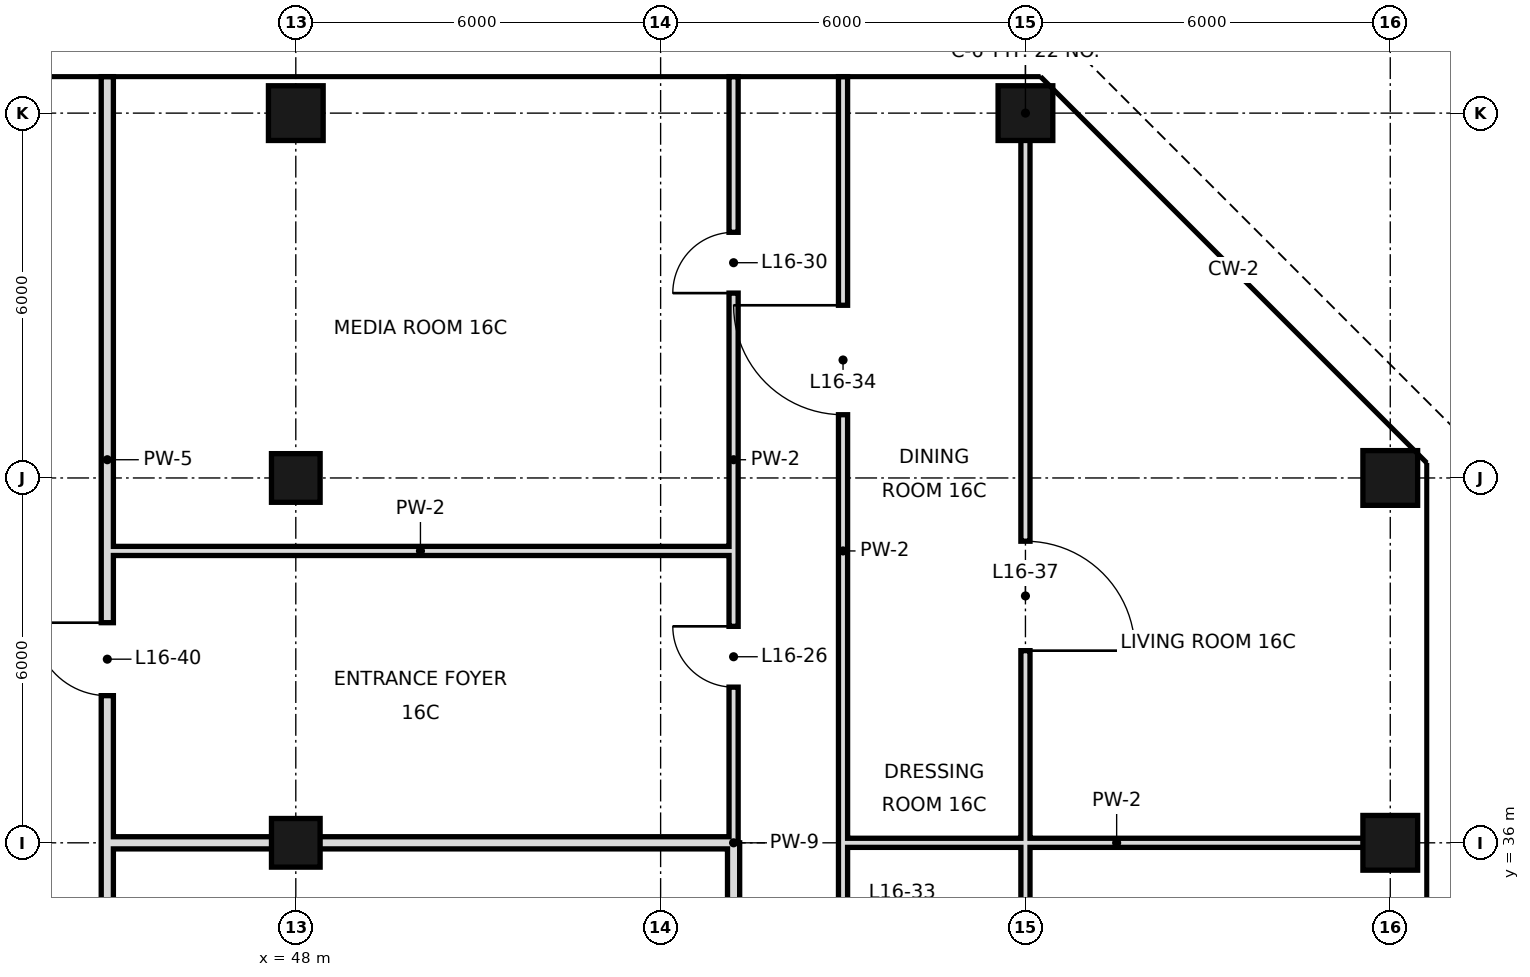
"""IFC4 building model, lengths in metres.
Left out: names, types, materials, properties, quantities, classifications, styles, units other than length and angle.
Written with IfcOpenShell. Run it as: python <this file> out.ifc"""

import sys

from ifc_helpers import new_model, si_unit, direction, frame, frame_2d, origin, origin_2d, place, context, subcontext, project, spatial, rectangle, hollow_rectangle, extrude, element, fill, save


model = new_model("IFC4")
c1 = context("Model", 3, precision=1e-05, world=origin(), true_north=direction((0.0, 1.0)))
c2 = subcontext(c1, "Body", "Model", "MODEL_VIEW")
j1 = project(units=[si_unit("LENGTHUNIT", "METRE"), si_unit("PLANEANGLEUNIT", "RADIAN")], contexts=[c1])
p1 = place(None, origin())
s1 = spatial("IfcSite", under=j1, at=p1, CompositionType="ELEMENT")
p2 = place(p1, origin())
s2 = spatial("IfcBuilding", under=s1, at=p2, CompositionType="ELEMENT")
p3 = place(p2, frame((0.0, 0.0, 78.6)))
s3 = spatial("IfcBuildingStorey", under=s2, at=p3, CompositionType="ELEMENT", Elevation=78.6)
for number, where, z_axis, x_axis in (
    (1, (48.0, 36.0, 0.0), (0.0, 0.0, 1.0), (1.0, 0.0, 0.0)),
    (2, (48.0, 42.0, 0.0), (0.0, 0.0, 1.0), (1.0, 0.0, 0.0)),
):
    element("IfcColumn", number, at=place(p3, frame(where, z_axis=z_axis, x_axis=x_axis)), inside=s3, PredefinedType="COLUMN", context=c2, shape_type="SweptSolid", body=[
        extrude(hollow_rectangle(XDim=0.8, YDim=0.8, WallThickness=0.04, at=origin_2d()), origin(), (0.0, 0.0, 1.0), 3.6),
    ])
for number, where, z_axis, x_axis in (
    (3, (48.0, 48.0, 0.0), (0.0, 0.0, 1.0), (1.0, 0.0, 0.0)),
    (4, (60.0, 48.0, 0.0), (0.0, 0.0, 1.0), (1.0, 0.0, 0.0)),
    (5, (66.0, 36.0, 0.0), (0.0, 0.0, 1.0), (1.0, 0.0, 0.0)),
    (6, (66.0, 42.0, 0.0), (0.0, 0.0, 1.0), (1.0, 0.0, 0.0)),
):
    element("IfcColumn", number, at=place(p3, frame(where, z_axis=z_axis, x_axis=x_axis)), inside=s3, PredefinedType="COLUMN", context=c2, shape_type="SweptSolid", body=[
        extrude(hollow_rectangle(XDim=0.9, YDim=0.9, WallThickness=0.045, at=origin_2d()), origin(), (0.0, 0.0, 1.0), 3.6),
    ])
p4 = place(p3, frame((44.9, 36.0, 0.0), z_axis=(0.0, 0.0, 1.0), x_axis=(0.0, 1.0, 0.0)))
e7 = element("IfcWall", 7, at=p4, inside=s3, PredefinedType="SOLIDWALL", context=c2, shape_type="SweptSolid", body=[
    extrude(rectangle(XDim=12.6, YDim=0.2, at=frame_2d((6.3, 0.0))), origin(), (0.0, 0.0, 1.0), 2.72),
])
p5 = place(p4, frame((2.42, 0.0, 0.0)))
e8 = element("IfcOpeningElement", 8, at=p5, cuts=e7, PredefinedType="OPENING", context=c2, shape_type="SweptSolid", body=[
    extrude(rectangle(XDim=1.2, YDim=2.4, at=frame_2d((0.6, 1.2))), frame((0.0, 0.11, 0.0), z_axis=(0.0, -1.0, 0.0), x_axis=(1.0, 0.0, 0.0)), (0.0, 0.0, 1.0), 0.22),
])
p6 = place(p3, frame((44.9, 32.4, 0.0), z_axis=(0.0, 0.0, 1.0), x_axis=(0.0, 1.0, 0.0)))
e9 = element("IfcWall", 9, at=p6, inside=s3, PredefinedType="SOLIDWALL", context=c2, shape_type="SweptSolid", body=[
    extrude(rectangle(XDim=3.6, YDim=0.2, at=frame_2d((1.8, 0.0))), origin(), (0.0, 0.0, 1.0), 3.42),
])
p7 = place(p3, frame((55.2, 32.4, 0.0), z_axis=(0.0, 0.0, 1.0), x_axis=(0.0, 1.0, 0.0)))
e10 = element("IfcWall", 10, at=p7, inside=s3, PredefinedType="SOLIDWALL", context=c2, shape_type="SweptSolid", body=[
    extrude(rectangle(XDim=3.6, YDim=0.2, at=frame_2d((1.8, 0.0))), origin(), (0.0, 0.0, 1.0), 2.52),
])
p8 = place(p7, frame((0.88, 0.0, 0.0)))
e11 = element("IfcOpeningElement", 11, at=p8, cuts=e10, PredefinedType="OPENING", context=c2, shape_type="SweptSolid", body=[
    extrude(rectangle(XDim=1.0, YDim=2.4, at=frame_2d((0.5, 1.2))), frame((0.0, 0.11, 0.0), z_axis=(0.0, -1.0, 0.0), x_axis=(1.0, 0.0, 0.0)), (0.0, 0.0, 1.0), 0.22),
])
p9 = place(p3, frame((55.2, 36.0, 0.0), z_axis=(0.0, 0.0, 1.0), x_axis=(0.0, 1.0, 0.0)))
e12 = element("IfcWall", 12, at=p9, inside=s3, PredefinedType="PARTITIONING", context=c2, shape_type="SweptSolid", body=[
    extrude(rectangle(XDim=12.6, YDim=0.15, at=frame_2d((6.3, 0.0))), origin(), (0.0, 0.0, 1.0), 3.42),
])
p10 = place(p9, frame((2.56, 0.0, 0.0)))
e13 = element("IfcOpeningElement", 13, at=p10, cuts=e12, PredefinedType="OPENING", context=c2, shape_type="SweptSolid", body=[
    extrude(rectangle(XDim=1.0, YDim=2.4, at=frame_2d((0.5, 1.2))), frame((0.0, 0.085, 0.0), z_axis=(0.0, -1.0, 0.0), x_axis=(1.0, 0.0, 0.0)), (0.0, 0.0, 1.0), 0.17),
])
p11 = place(p9, frame((9.04, 0.0, 0.0)))
e14 = element("IfcOpeningElement", 14, at=p11, cuts=e12, PredefinedType="OPENING", context=c2, shape_type="SweptSolid", body=[
    extrude(rectangle(XDim=1.0, YDim=2.4, at=frame_2d((0.5, 1.2))), frame((0.0, 0.085, 0.0), z_axis=(0.0, -1.0, 0.0), x_axis=(1.0, 0.0, 0.0)), (0.0, 0.0, 1.0), 0.17),
])
p12 = place(p3, frame((57.0, 33.0, 0.0), z_axis=(0.0, 0.0, 1.0), x_axis=(0.0, 1.0, 0.0)))
e15 = element("IfcWall", 15, at=p12, inside=s3, PredefinedType="PARTITIONING", context=c2, shape_type="SweptSolid", body=[
    extrude(rectangle(XDim=15.6, YDim=0.15, at=frame_2d((7.8, 0.0))), origin(), (0.0, 0.0, 1.0), 3.42),
])
p13 = place(p12, frame((0.7, 0.0, 0.0)))
e16 = element("IfcOpeningElement", 16, at=p13, cuts=e15, PredefinedType="OPENING", context=c2, shape_type="SweptSolid", body=[
    extrude(rectangle(XDim=1.0, YDim=2.4, at=frame_2d((0.5, 1.2))), frame((0.0, 0.085, 0.0), z_axis=(0.0, -1.0, 0.0), x_axis=(1.0, 0.0, 0.0)), (0.0, 0.0, 1.0), 0.17),
])
p14 = place(p12, frame((10.04, 0.0, 0.0)))
e17 = element("IfcOpeningElement", 17, at=p14, cuts=e15, PredefinedType="OPENING", context=c2, shape_type="SweptSolid", body=[
    extrude(rectangle(XDim=1.8, YDim=2.4, at=frame_2d((0.9, 1.2))), frame((0.0, 0.085, 0.0), z_axis=(0.0, -1.0, 0.0), x_axis=(1.0, 0.0, 0.0)), (0.0, 0.0, 1.0), 0.17),
])
p15 = place(p3, frame((60.0, 33.0, 0.0), z_axis=(0.0, 0.0, 1.0), x_axis=(0.0, 1.0, 0.0)))
e18 = element("IfcWall", 18, at=p15, inside=s3, PredefinedType="PARTITIONING", context=c2, shape_type="SweptSolid", body=[
    extrude(rectangle(XDim=15.0, YDim=0.15, at=frame_2d((7.5, 0.0))), origin(), (0.0, 0.0, 1.0), 3.42),
])
p16 = place(p15, frame((0.7, 0.0, 0.0)))
e19 = element("IfcOpeningElement", 19, at=p16, cuts=e18, PredefinedType="OPENING", context=c2, shape_type="SweptSolid", body=[
    extrude(rectangle(XDim=1.0, YDim=2.4, at=frame_2d((0.5, 1.2))), frame((0.0, 0.085, 0.0), z_axis=(0.0, -1.0, 0.0), x_axis=(1.0, 0.0, 0.0)), (0.0, 0.0, 1.0), 0.17),
])
p17 = place(p15, frame((6.16, 0.0, 0.0)))
e20 = element("IfcOpeningElement", 20, at=p17, cuts=e18, PredefinedType="OPENING", context=c2, shape_type="SweptSolid", body=[
    extrude(rectangle(XDim=1.8, YDim=2.4, at=frame_2d((0.9, 1.2))), frame((0.0, 0.085, 0.0), z_axis=(0.0, -1.0, 0.0), x_axis=(1.0, 0.0, 0.0)), (0.0, 0.0, 1.0), 0.17),
])
p18 = place(p3, frame((44.9, 36.0, 0.0), z_axis=(0.0, 0.0, 1.0), x_axis=(1.0, 0.0, 0.0)))
e21 = element("IfcWall", 21, at=p18, inside=s3, PredefinedType="SOLIDWALL", context=c2, shape_type="SweptSolid", body=[
    extrude(rectangle(XDim=10.3, YDim=0.2, at=frame_2d((5.15, 0.0))), origin(), (0.0, 0.0, 1.0), 2.52),
])
p19 = place(p3, frame((57.0, 36.0, 0.0), z_axis=(0.0, 0.0, 1.0), x_axis=(1.0, 0.0, 0.0)))
e22 = element("IfcWall", 22, at=p19, inside=s3, PredefinedType="PARTITIONING", context=c2, shape_type="SweptSolid", body=[
    extrude(rectangle(XDim=9.0, YDim=0.15, at=frame_2d((4.5, 0.0))), origin(), (0.0, 0.0, 1.0), 2.52),
])
p20 = place(p3, frame((44.9, 40.8, 0.0), z_axis=(0.0, 0.0, 1.0), x_axis=(1.0, 0.0, 0.0)))
e23 = element("IfcWall", 23, at=p20, inside=s3, PredefinedType="PARTITIONING", context=c2, shape_type="SweptSolid", body=[
    extrude(rectangle(XDim=10.3, YDim=0.15, at=frame_2d((5.15, 0.0))), origin(), (0.0, 0.0, 1.0), 3.42),
])
p21 = place(p10, frame((1.0, 0.0, 0.0), z_axis=(0.0, 0.0, 1.0), x_axis=(-1.0, 0.0, 0.0)))
e24 = element("IfcDoor", 24, at=p21, inside=s3, OperationType="SINGLE_SWING_LEFT", PredefinedType="DOOR", context=c2, shape_type="SweptSolid", body=[
    extrude(rectangle(XDim=1.0, YDim=2.4, at=frame_2d((0.5, 1.2))), frame((0.0, 0.025, 0.0), z_axis=(0.0, -1.0, 0.0), x_axis=(1.0, 0.0, 0.0)), (0.0, 0.0, 1.0), 0.05),
])
fill(e13, e24)
p22 = place(p11, origin())
e25 = element("IfcDoor", 25, at=p22, inside=s3, OperationType="SINGLE_SWING_LEFT", PredefinedType="DOOR", context=c2, shape_type="SweptSolid", body=[
    extrude(rectangle(XDim=1.0, YDim=2.4, at=frame_2d((0.5, 1.2))), frame((0.0, 0.025, 0.0), z_axis=(0.0, -1.0, 0.0), x_axis=(1.0, 0.0, 0.0)), (0.0, 0.0, 1.0), 0.05),
])
fill(e14, e25)
p23 = place(p14, frame((1.8, 0.0, 0.0), z_axis=(0.0, 0.0, 1.0), x_axis=(-1.0, 0.0, 0.0)))
e26 = element("IfcDoor", 26, at=p23, inside=s3, OperationType="SINGLE_SWING_LEFT", PredefinedType="DOOR", context=c2, shape_type="SweptSolid", body=[
    extrude(rectangle(XDim=1.8, YDim=2.4, at=frame_2d((0.9, 1.2))), frame((0.0, 0.025, 0.0), z_axis=(0.0, -1.0, 0.0), x_axis=(1.0, 0.0, 0.0)), (0.0, 0.0, 1.0), 0.05),
])
fill(e17, e26)
p24 = place(p17, frame((1.8, 0.0, 0.0), z_axis=(0.0, 0.0, 1.0), x_axis=(-1.0, 0.0, 0.0)))
e27 = element("IfcDoor", 27, at=p24, inside=s3, OperationType="SINGLE_SWING_RIGHT", PredefinedType="DOOR", context=c2, shape_type="SweptSolid", body=[
    extrude(rectangle(XDim=1.8, YDim=2.4, at=frame_2d((0.9, 1.2))), frame((0.0, 0.025, 0.0), z_axis=(0.0, -1.0, 0.0), x_axis=(1.0, 0.0, 0.0)), (0.0, 0.0, 1.0), 0.05),
])
fill(e20, e27)
p25 = place(p5, frame((1.2, 0.0, 0.0), z_axis=(0.0, 0.0, 1.0), x_axis=(-1.0, 0.0, 0.0)))
e28 = element("IfcDoor", 28, at=p25, inside=s3, OperationType="SINGLE_SWING_LEFT", PredefinedType="DOOR", context=c2, shape_type="SweptSolid", body=[
    extrude(rectangle(XDim=1.2, YDim=2.4, at=frame_2d((0.6, 1.2))), frame((0.0, 0.025, 0.0), z_axis=(0.0, -1.0, 0.0), x_axis=(1.0, 0.0, 0.0)), (0.0, 0.0, 1.0), 0.05),
])
fill(e8, e28)
save(model, sys.argv[1])
